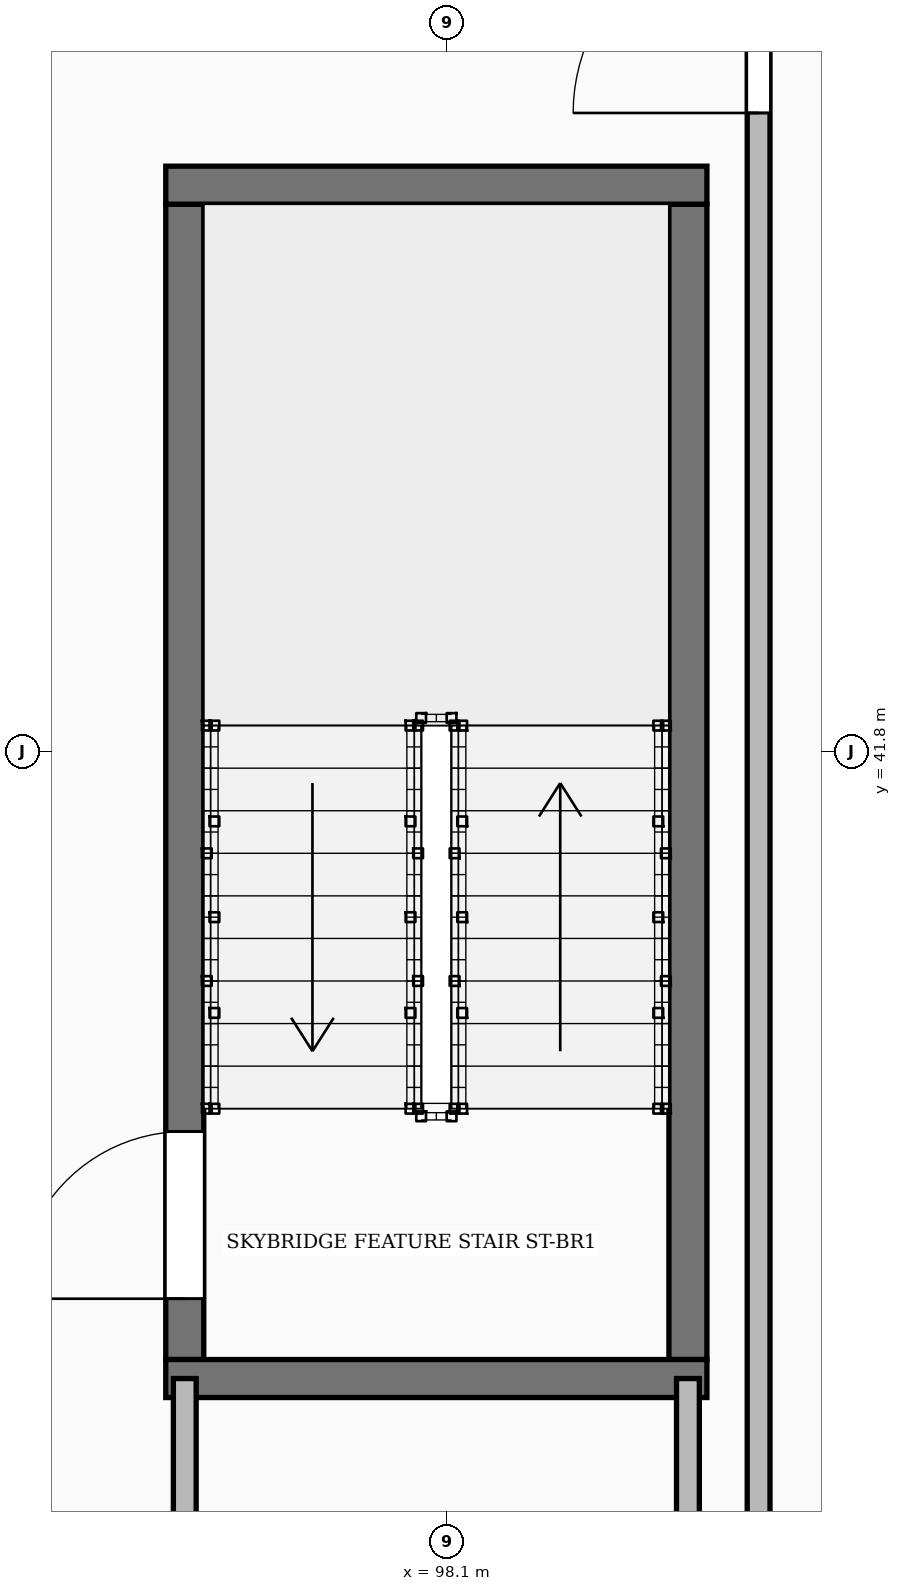
"""IFC4 building model, lengths in metres.
Left out: names, types, materials, properties, quantities, classifications, styles, units other than length and angle.
Written with IfcOpenShell. Run it as: python <this file> out.ifc"""

import sys

from ifc_helpers import new_model, si_unit, direction, frame, frame_2d, origin, place, context, subcontext, project, spatial, rectangle, extrude, element, fill, save


model = new_model("IFC4")
c1 = context("Model", 3, precision=1e-05, world=origin(), true_north=direction((0.0, 1.0)))
c2 = subcontext(c1, "Body", "Model", "MODEL_VIEW")
j1 = project(units=[si_unit("LENGTHUNIT", "METRE"), si_unit("PLANEANGLEUNIT", "RADIAN")], contexts=[c1])
p1 = place(None, origin())
s1 = spatial("IfcSite", under=j1, at=p1, CompositionType="ELEMENT")
p2 = place(p1, origin())
s2 = spatial("IfcBuilding", under=s1, at=p2, CompositionType="ELEMENT")
p3 = place(p2, frame((0.0, 0.0, 142.9)))
s3 = spatial("IfcBuildingStorey", under=s2, at=p3, CompositionType="ELEMENT", Elevation=142.9)
p4 = place(p3, frame((96.375, 37.8, 0.0), z_axis=(0.0, 0.0, 1.0), x_axis=(0.0, 1.0, 0.0)))
e1 = element("IfcWall", 1, at=p4, inside=s3, PredefinedType="SHEAR", context=c2, shape_type="SweptSolid", body=[
    extrude(rectangle(XDim=7.6, YDim=0.25, at=frame_2d((3.8, 0.0))), origin(), (0.0, 0.0, 1.0), 3.6),
])
p5 = place(p4, frame((0.4, 0.0, 0.0)))
e2 = element("IfcOpeningElement", 2, at=p5, cuts=e1, PredefinedType="OPENING", context=c2, shape_type="SweptSolid", body=[
    extrude(rectangle(XDim=1.1, YDim=2.1, at=frame_2d((0.55, 1.05))), frame((0.0, 0.135, 0.0), z_axis=(0.0, -1.0, 0.0), x_axis=(1.0, 0.0, 0.0)), (0.0, 0.0, 1.0), 0.27),
])
p6 = place(p3, frame((99.685, 37.8, 0.0), z_axis=(0.0, 0.0, 1.0), x_axis=(0.0, 1.0, 0.0)))
e3 = element("IfcWall", 3, at=p6, inside=s3, PredefinedType="SHEAR", context=c2, shape_type="SweptSolid", body=[
    extrude(rectangle(XDim=7.6, YDim=0.25, at=frame_2d((3.8, 0.0))), origin(), (0.0, 0.0, 1.0), 3.6),
])
for number, where, z_axis, x_axis in (
    (4, (96.25, 37.675, 0.0), (0.0, 0.0, 1.0), (1.0, 0.0, 0.0)),
    (5, (96.25, 45.525, 0.0), (0.0, 0.0, 1.0), (1.0, 0.0, 0.0)),
):
    element("IfcWall", number, at=place(p3, frame(where, z_axis=z_axis, x_axis=x_axis)), inside=s3, PredefinedType="SHEAR", context=c2, shape_type="SweptSolid", body=[
        extrude(rectangle(XDim=3.56, YDim=0.25, at=frame_2d((1.78, 0.0))), origin(), (0.0, 0.0, 1.0), 3.6),
    ])
p7 = place(p3, frame((96.375, 32.95, 0.0), z_axis=(0.0, 0.0, 1.0), x_axis=(0.0, 1.0, 0.0)))
e6 = element("IfcWall", 6, at=p7, inside=s3, PredefinedType="PARTITIONING", context=c2, shape_type="SweptSolid", body=[
    extrude(rectangle(XDim=4.725, YDim=0.15, at=frame_2d((2.363, 0.0))), origin(), (0.0, 0.0, 1.0), 2.384),
])
p8 = place(p7, frame((1.6, 0.0, 0.0)))
e7 = element("IfcOpeningElement", 7, at=p8, cuts=e6, PredefinedType="OPENING", context=c2, shape_type="SweptSolid", body=[
    extrude(rectangle(XDim=0.96, YDim=2.1, at=frame_2d((0.48, 1.05))), frame((0.0, 0.085, 0.0), z_axis=(0.0, -1.0, 0.0), x_axis=(1.0, 0.0, 0.0)), (0.0, 0.0, 1.0), 0.17),
])
p9 = place(p3, frame((99.685, 32.95, 0.0), z_axis=(0.0, 0.0, 1.0), x_axis=(0.0, 1.0, 0.0)))
e8 = element("IfcWall", 8, at=p9, inside=s3, PredefinedType="PARTITIONING", context=c2, shape_type="SweptSolid", body=[
    extrude(rectangle(XDim=4.725, YDim=0.15, at=frame_2d((2.363, 0.0))), origin(), (0.0, 0.0, 1.0), 2.384),
])
p10 = place(p3, frame((100.15, 32.9, 0.0), z_axis=(0.0, 0.0, 1.0), x_axis=(0.0, 1.0, 0.0)))
e9 = element("IfcWall", 9, at=p10, inside=s3, PredefinedType="PARTITIONING", context=c2, shape_type="SweptSolid", body=[
    extrude(rectangle(XDim=17.8, YDim=0.15, at=frame_2d((8.9, 0.0))), origin(), (0.0, 0.0, 1.0), 3.31),
])
p11 = place(p10, frame((13.1, 0.0, 0.0)))
e10 = element("IfcOpeningElement", 10, at=p11, cuts=e9, PredefinedType="OPENING", context=c2, shape_type="SweptSolid", body=[
    extrude(rectangle(XDim=1.22, YDim=2.18, at=frame_2d((0.61, 1.09))), frame((0.0, 0.085, 0.0), z_axis=(0.0, -1.0, 0.0), x_axis=(1.0, 0.0, 0.0)), (0.0, 0.0, 1.0), 0.17),
])
p12 = place(p5, origin())
e11 = element("IfcDoor", 11, at=p12, inside=s3, OperationType="SINGLE_SWING_LEFT", PredefinedType="DOOR", context=c2, shape_type="SweptSolid", body=[
    extrude(rectangle(XDim=1.1, YDim=2.1, at=frame_2d((0.55, 1.05))), frame((0.0, 0.025, 0.0), z_axis=(0.0, -1.0, 0.0), x_axis=(1.0, 0.0, 0.0)), (0.0, 0.0, 1.0), 0.05),
])
fill(e2, e11)
p13 = place(p11, origin())
e12 = element("IfcDoor", 12, at=p13, inside=s3, OperationType="SINGLE_SWING_LEFT", PredefinedType="DOOR", context=c2, shape_type="SweptSolid", body=[
    extrude(rectangle(XDim=1.22, YDim=2.18, at=frame_2d((0.61, 1.09))), frame((0.0, 0.025, 0.0), z_axis=(0.0, -1.0, 0.0), x_axis=(1.0, 0.0, 0.0)), (0.0, 0.0, 1.0), 0.05),
])
fill(e10, e12)
save(model, sys.argv[1])
